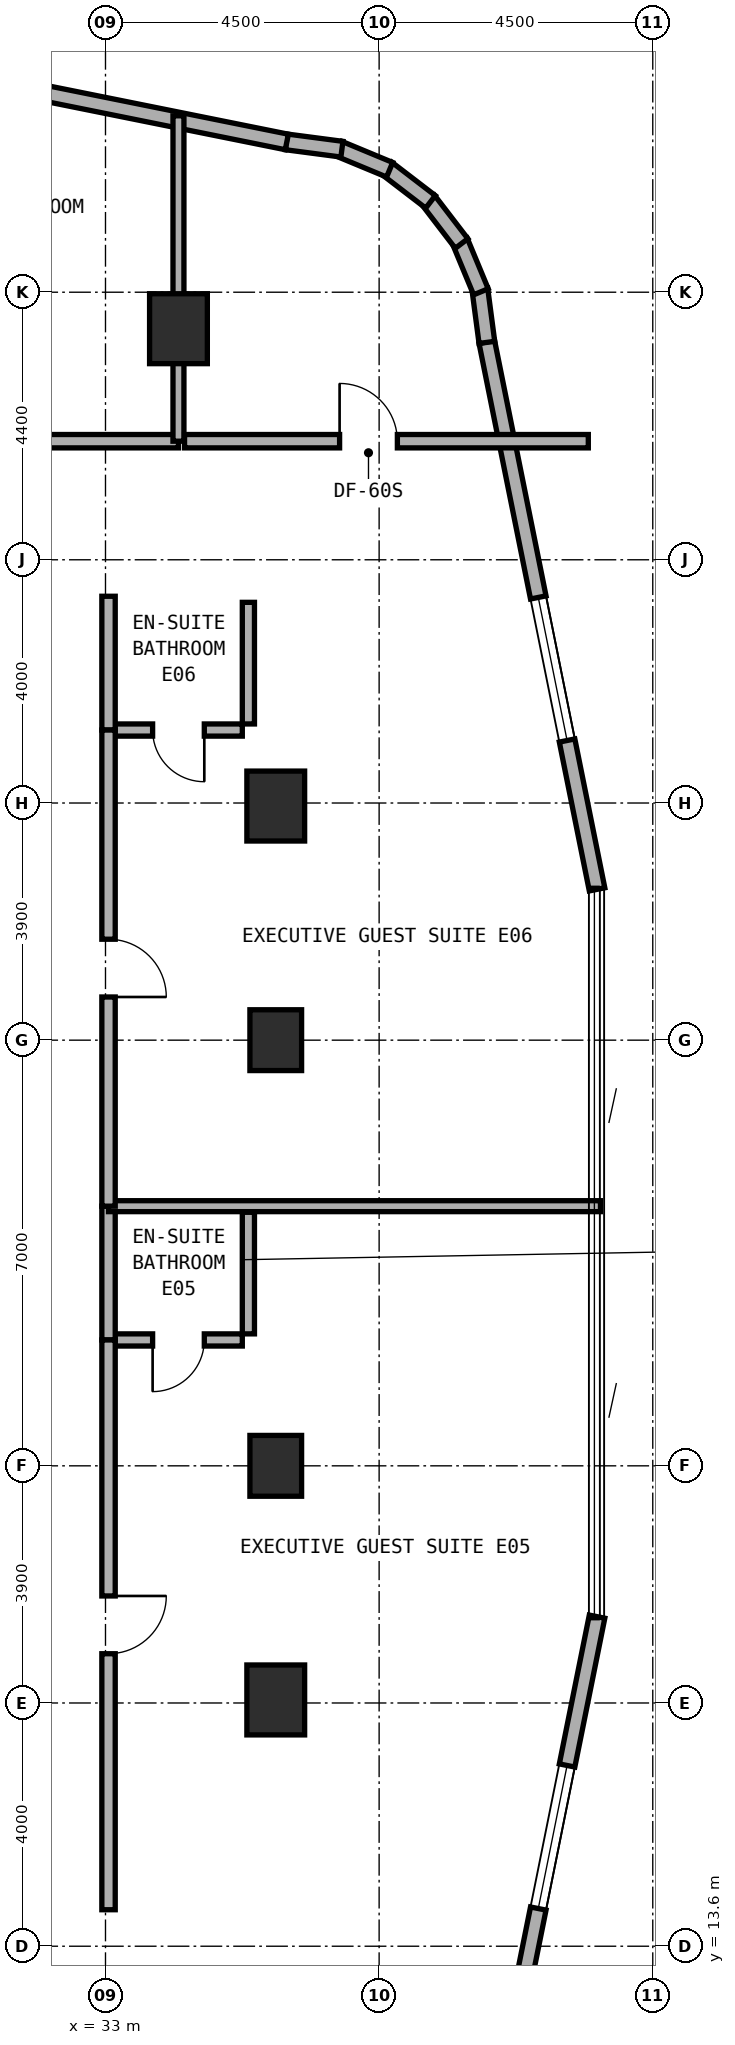
"""IFC4 building model, lengths in metres.
Left out: names, types, materials, properties, quantities, classifications, styles, units other than length and angle.
Written with IfcOpenShell. Run it as: python <this file> out.ifc"""

import sys

from ifc_helpers import new_model, si_unit, direction, frame, frame_2d, origin, origin_2d, place, context, subcontext, project, spatial, rectangle, extrude, element, fill, save


model = new_model("IFC4")
c1 = context("Model", 3, precision=1e-05, world=origin(), true_north=direction((0.0, 1.0)))
c2 = subcontext(c1, "Body", "Model", "MODEL_VIEW")
j1 = project(units=[si_unit("LENGTHUNIT", "METRE"), si_unit("PLANEANGLEUNIT", "RADIAN")], contexts=[c1])
p1 = place(None, origin())
s1 = spatial("IfcSite", under=j1, at=p1, CompositionType="ELEMENT")
p2 = place(p1, origin())
s2 = spatial("IfcBuilding", under=s1, at=p2, CompositionType="ELEMENT")
p3 = place(p2, frame((0.0, 0.0, 112.5)))
s3 = spatial("IfcBuildingStorey", under=s2, at=p3, CompositionType="ELEMENT", Elevation=112.5)
p4 = place(p3, frame((34.2, 40.2, 0.0), z_axis=(0.0, 0.0, 1.0), x_axis=(1.0, 0.0, 0.0)))
e1 = element("IfcColumn", 1, at=p4, inside=s3, PredefinedType="COLUMN", context=c2, shape_type="SweptSolid", body=[
    extrude(rectangle(XDim=0.95, YDim=1.15, at=origin_2d()), origin(), (0.0, 0.0, 1.0), 3.5),
])
for number, where, z_axis, x_axis in (
    (2, (35.8, 21.5, 0.0), (0.0, 0.0, 1.0), (1.0, 0.0, 0.0)),
    (3, (35.8, 28.5, 0.0), (0.0, 0.0, 1.0), (1.0, 0.0, 0.0)),
):
    element("IfcColumn", number, at=place(p3, frame(where, z_axis=z_axis, x_axis=x_axis)), inside=s3, PredefinedType="COLUMN", context=c2, shape_type="SweptSolid", body=[
        extrude(rectangle(XDim=0.85, YDim=1.0, at=origin_2d()), origin(), (0.0, 0.0, 1.0), 3.5),
    ])
for number, where, z_axis, x_axis in (
    (4, (35.8, 17.65, 0.0), (0.0, 0.0, 1.0), (1.0, 0.0, 0.0)),
    (5, (35.8, 32.35, 0.0), (0.0, 0.0, 1.0), (1.0, 0.0, 0.0)),
):
    element("IfcColumn", number, at=place(p3, frame(where, z_axis=z_axis, x_axis=x_axis)), inside=s3, PredefinedType="COLUMN", context=c2, shape_type="SweptSolid", body=[
        extrude(rectangle(XDim=0.95, YDim=1.15, at=origin_2d()), origin(), (0.0, 0.0, 1.0), 3.5),
    ])
p5 = place(p3, frame((39.271, 10.018, 0.0), z_axis=(0.0, 0.0, 1.0), x_axis=(0.197435082048, 0.980315963543, 0.0)))
e6 = element("IfcWall", 6, at=p5, inside=s3, PredefinedType="STANDARD", context=c2, shape_type="SweptSolid", body=[
    extrude(rectangle(XDim=9.183, YDim=0.26, at=frame_2d((4.591, 0.0))), origin(), (0.0, 0.0, 1.0), 3.22),
])
p6 = place(p5, frame((4.286, 0.0, 0.8)))
e7 = element("IfcOpeningElement", 7, at=p6, cuts=e6, PredefinedType="OPENING", context=c2, shape_type="SweptSolid", body=[
    extrude(rectangle(XDim=2.4, YDim=1.6, at=frame_2d((1.2, 0.8))), frame((0.0, 0.14, 0.0), z_axis=(0.0, -1.0, 0.0), x_axis=(1.0, 0.0, 0.0)), (0.0, 0.0, 1.0), 0.28),
])
p7 = place(p3, frame((41.084, 30.98, 0.0), z_axis=(0.0, 0.0, 1.0), x_axis=(-0.197435082048, 0.980315963543, 0.0)))
e8 = element("IfcWall", 8, at=p7, inside=s3, PredefinedType="STANDARD", context=c2, shape_type="SweptSolid", body=[
    extrude(rectangle(XDim=9.183, YDim=0.26, at=frame_2d((4.591, 0.0))), origin(), (0.0, 0.0, 1.0), 3.22),
])
p8 = place(p7, frame((2.497, 0.0, 0.8)))
e9 = element("IfcOpeningElement", 9, at=p8, cuts=e8, PredefinedType="OPENING", context=c2, shape_type="SweptSolid", body=[
    extrude(rectangle(XDim=2.4, YDim=1.6, at=frame_2d((1.2, 0.8))), frame((0.0, 0.14, 0.0), z_axis=(0.0, -1.0, 0.0), x_axis=(1.0, 0.0, 0.0)), (0.0, 0.0, 1.0), 0.28),
])
p9 = place(p3, frame((39.272, 39.975, 0.0), z_axis=(0.0, 0.0, 1.0), x_axis=(-0.130953706898, 0.991388484223, 0.0)))
e10 = element("IfcWall", 10, at=p9, inside=s3, PredefinedType="STANDARD", context=c2, shape_type="SweptSolid", body=[
    extrude(rectangle(XDim=0.885, YDim=0.26, at=frame_2d((0.443, 0.0))), origin(), (0.0, 0.0, 1.0), 3.22),
])
p10 = place(p3, frame((39.174, 40.807, 0.0), z_axis=(0.0, 0.0, 1.0), x_axis=(-0.383290660547, 0.923627776508, 0.0)))
e11 = element("IfcWall", 11, at=p10, inside=s3, PredefinedType="STANDARD", context=c2, shape_type="SweptSolid", body=[
    extrude(rectangle(XDim=0.903, YDim=0.26, at=frame_2d((0.452, 0.0))), origin(), (0.0, 0.0, 1.0), 3.22),
])
p11 = place(p3, frame((38.856, 41.601, 0.0), z_axis=(0.0, 0.0, 1.0), x_axis=(-0.608624690463, 0.793458244748, 0.0)))
e12 = element("IfcWall", 12, at=p11, inside=s3, PredefinedType="STANDARD", context=c2, shape_type="SweptSolid", body=[
    extrude(rectangle(XDim=0.902, YDim=0.26, at=frame_2d((0.451, 0.0))), origin(), (0.0, 0.0, 1.0), 3.22),
])
p12 = place(p3, frame((38.345, 42.286, 0.0), z_axis=(0.0, 0.0, 1.0), x_axis=(-0.793558456666, 0.608494022858, 0.0)))
e13 = element("IfcWall", 13, at=p12, inside=s3, PredefinedType="STANDARD", context=c2, shape_type="SweptSolid", body=[
    extrude(rectangle(XDim=0.902, YDim=0.26, at=frame_2d((0.451, 0.0))), origin(), (0.0, 0.0, 1.0), 3.22),
])
p13 = place(p3, frame((37.673, 42.814, 0.0), z_axis=(0.0, 0.0, 1.0), x_axis=(-0.923683767999, 0.383155708213, 0.0)))
e14 = element("IfcWall", 14, at=p13, inside=s3, PredefinedType="STANDARD", context=c2, shape_type="SweptSolid", body=[
    extrude(rectangle(XDim=0.903, YDim=0.26, at=frame_2d((0.451, 0.0))), origin(), (0.0, 0.0, 1.0), 3.22),
])
p14 = place(p3, frame((36.888, 43.152, 0.0), z_axis=(0.0, 0.0, 1.0), x_axis=(-0.991487658083, 0.130200706103, 0.0)))
e15 = element("IfcWall", 15, at=p14, inside=s3, PredefinedType="STANDARD", context=c2, shape_type="SweptSolid", body=[
    extrude(rectangle(XDim=0.921, YDim=0.26, at=frame_2d((0.46, 0.0))), origin(), (0.0, 0.0, 1.0), 3.22),
])
p15 = place(p3, frame((35.982, 43.271, 0.0), z_axis=(0.0, 0.0, 1.0), x_axis=(-0.980317172899, 0.197429077186, 0.0)))
e16 = element("IfcWall", 16, at=p15, inside=s3, PredefinedType="STANDARD", context=c2, shape_type="SweptSolid", body=[
    extrude(rectangle(XDim=9.117, YDim=0.26, at=frame_2d((4.559, 0.0))), origin(), (0.0, 0.0, 1.0), 3.22),
])
p16 = place(p15, frame((4.305, 0.0, 0.8)))
e17 = element("IfcOpeningElement", 17, at=p16, cuts=e16, PredefinedType="OPENING", context=c2, shape_type="SweptSolid", body=[
    extrude(rectangle(XDim=2.4, YDim=1.6, at=frame_2d((1.2, 0.8))), frame((0.0, 0.14, 0.0), z_axis=(0.0, -1.0, 0.0), x_axis=(1.0, 0.0, 0.0)), (0.0, 0.0, 1.0), 0.28),
])
p17 = place(p3, frame((28.0, 38.35, 0.0), z_axis=(0.0, 0.0, 1.0), x_axis=(1.0, 0.0, 0.0)))
e18 = element("IfcWall", 18, at=p17, inside=s3, PredefinedType="SOLIDWALL", context=c2, shape_type="SweptSolid", body=[
    extrude(rectangle(XDim=6.2, YDim=0.22, at=frame_2d((3.1, 0.0))), origin(), (0.0, 0.0, 1.0), 2.695),
])
p18 = place(p17, frame((2.625, 0.0, 0.0)))
e19 = element("IfcOpeningElement", 19, at=p18, cuts=e18, PredefinedType="OPENING", context=c2, shape_type="SweptSolid", body=[
    extrude(rectangle(XDim=0.95, YDim=2.1, at=frame_2d((0.475, 1.05))), frame((0.0, 0.12, 0.0), z_axis=(0.0, -1.0, 0.0), x_axis=(1.0, 0.0, 0.0)), (0.0, 0.0, 1.0), 0.24),
])
p19 = place(p3, frame((34.2, 38.35, 0.0), z_axis=(0.0, 0.0, 1.0), x_axis=(0.0, 1.0, 0.0)))
e20 = element("IfcWall", 20, at=p19, inside=s3, PredefinedType="SOLIDWALL", context=c2, shape_type="SweptSolid", body=[
    extrude(rectangle(XDim=5.351, YDim=0.18, at=frame_2d((2.675, 0.0))), origin(), (0.0, 0.0, 1.0), 2.695),
])
p20 = place(p3, frame((34.3, 38.35, 0.0), z_axis=(0.0, 0.0, 1.0), x_axis=(1.0, 0.0, 0.0)))
e21 = element("IfcWall", 21, at=p20, inside=s3, PredefinedType="SOLIDWALL", context=c2, shape_type="SweptSolid", body=[
    extrude(rectangle(XDim=6.64, YDim=0.22, at=frame_2d((3.32, 0.0))), origin(), (0.0, 0.0, 1.0), 2.835),
])
p21 = place(p20, frame((2.55, 0.0, 0.0)))
e22 = element("IfcOpeningElement", 22, at=p21, cuts=e21, PredefinedType="OPENING", context=c2, shape_type="SweptSolid", body=[
    extrude(rectangle(XDim=0.95, YDim=2.1, at=frame_2d((0.475, 1.05))), frame((0.0, 0.12, 0.0), z_axis=(0.0, -1.0, 0.0), x_axis=(1.0, 0.0, 0.0)), (0.0, 0.0, 1.0), 0.24),
])
p22 = place(p3, frame((33.15, 23.57, 0.0), z_axis=(0.0, 0.0, 1.0), x_axis=(1.0, 0.0, 0.0)))
e23 = element("IfcWall", 23, at=p22, inside=s3, PredefinedType="PLUMBINGWALL", context=c2, shape_type="SweptSolid", body=[
    extrude(rectangle(XDim=2.1, YDim=0.2, at=frame_2d((1.05, 0.0))), origin(), (0.0, 0.0, 1.0), 3.22),
])
p23 = place(p22, frame((0.625, 0.0, 0.0)))
e24 = element("IfcOpeningElement", 24, at=p23, cuts=e23, PredefinedType="OPENING", context=c2, shape_type="SweptSolid", body=[
    extrude(rectangle(XDim=0.85, YDim=2.1, at=frame_2d((0.425, 1.05))), frame((0.0, 0.11, 0.0), z_axis=(0.0, -1.0, 0.0), x_axis=(1.0, 0.0, 0.0)), (0.0, 0.0, 1.0), 0.22),
])
p24 = place(p3, frame((35.35, 23.67, 0.0), z_axis=(0.0, 0.0, 1.0), x_axis=(0.0, 1.0, 0.0)))
e25 = element("IfcWall", 25, at=p24, inside=s3, PredefinedType="PLUMBINGWALL", context=c2, shape_type="SweptSolid", body=[
    extrude(rectangle(XDim=2.0, YDim=0.2, at=frame_2d((1.0, 0.0))), origin(), (0.0, 0.0, 1.0), 3.22),
])
p25 = place(p3, frame((33.05, 23.57, 0.0), z_axis=(0.0, 0.0, 1.0), x_axis=(0.0, 1.0, 0.0)))
e26 = element("IfcWall", 26, at=p25, inside=s3, PredefinedType="SOLIDWALL", context=c2, shape_type="SweptSolid", body=[
    extrude(rectangle(XDim=2.2, YDim=0.22, at=frame_2d((1.1, 0.0))), origin(), (0.0, 0.0, 1.0), 3.22),
])
p26 = place(p3, frame((33.05, 14.2, 0.0), z_axis=(0.0, 0.0, 1.0), x_axis=(0.0, 1.0, 0.0)))
e27 = element("IfcWall", 27, at=p26, inside=s3, PredefinedType="SOLIDWALL", context=c2, shape_type="SweptSolid", body=[
    extrude(rectangle(XDim=9.37, YDim=0.22, at=frame_2d((4.685, 0.0))), origin(), (0.0, 0.0, 1.0), 2.695),
])
p27 = place(p26, frame((4.21, 0.0, 0.0)))
e28 = element("IfcOpeningElement", 28, at=p27, cuts=e27, PredefinedType="OPENING", context=c2, shape_type="SweptSolid", body=[
    extrude(rectangle(XDim=0.95, YDim=2.1, at=frame_2d((0.475, 1.05))), frame((0.0, 0.12, 0.0), z_axis=(0.0, -1.0, 0.0), x_axis=(1.0, 0.0, 0.0)), (0.0, 0.0, 1.0), 0.24),
])
p28 = place(p3, frame((33.05, 25.77, 0.0), z_axis=(0.0, 0.0, 1.0), x_axis=(1.0, 0.0, 0.0)))
e29 = element("IfcWall", 29, at=p28, inside=s3, PredefinedType="SOLIDWALL", context=c2, shape_type="SweptSolid", body=[
    extrude(rectangle(XDim=8.09, YDim=0.18, at=frame_2d((4.045, 0.0))), origin(), (0.0, 0.0, 1.0), 2.835),
])
p29 = place(p3, frame((33.15, 33.6, 0.0), z_axis=(0.0, 0.0, 1.0), x_axis=(1.0, 0.0, 0.0)))
e30 = element("IfcWall", 30, at=p29, inside=s3, PredefinedType="PLUMBINGWALL", context=c2, shape_type="SweptSolid", body=[
    extrude(rectangle(XDim=2.1, YDim=0.2, at=frame_2d((1.05, 0.0))), origin(), (0.0, 0.0, 1.0), 3.22),
])
p30 = place(p29, frame((0.625, 0.0, 0.0)))
e31 = element("IfcOpeningElement", 31, at=p30, cuts=e30, PredefinedType="OPENING", context=c2, shape_type="SweptSolid", body=[
    extrude(rectangle(XDim=0.85, YDim=2.1, at=frame_2d((0.425, 1.05))), frame((0.0, 0.11, 0.0), z_axis=(0.0, -1.0, 0.0), x_axis=(1.0, 0.0, 0.0)), (0.0, 0.0, 1.0), 0.22),
])
p31 = place(p3, frame((35.35, 33.7, 0.0), z_axis=(0.0, 0.0, 1.0), x_axis=(0.0, 1.0, 0.0)))
e32 = element("IfcWall", 32, at=p31, inside=s3, PredefinedType="PLUMBINGWALL", context=c2, shape_type="SweptSolid", body=[
    extrude(rectangle(XDim=2.0, YDim=0.2, at=frame_2d((1.0, 0.0))), origin(), (0.0, 0.0, 1.0), 2.835),
])
p32 = place(p3, frame((33.05, 33.6, 0.0), z_axis=(0.0, 0.0, 1.0), x_axis=(0.0, 1.0, 0.0)))
e33 = element("IfcWall", 33, at=p32, inside=s3, PredefinedType="SOLIDWALL", context=c2, shape_type="SweptSolid", body=[
    extrude(rectangle(XDim=2.2, YDim=0.22, at=frame_2d((1.1, 0.0))), origin(), (0.0, 0.0, 1.0), 3.22),
])
p33 = place(p3, frame((33.05, 25.77, 0.0), z_axis=(0.0, 0.0, 1.0), x_axis=(0.0, 1.0, 0.0)))
e34 = element("IfcWall", 34, at=p33, inside=s3, PredefinedType="SOLIDWALL", context=c2, shape_type="SweptSolid", body=[
    extrude(rectangle(XDim=7.83, YDim=0.22, at=frame_2d((3.915, 0.0))), origin(), (0.0, 0.0, 1.0), 2.695),
])
p34 = place(p33, frame((3.44, 0.0, 0.0)))
e35 = element("IfcOpeningElement", 35, at=p34, cuts=e34, PredefinedType="OPENING", context=c2, shape_type="SweptSolid", body=[
    extrude(rectangle(XDim=0.95, YDim=2.1, at=frame_2d((0.475, 1.05))), frame((0.0, 0.12, 0.0), z_axis=(0.0, -1.0, 0.0), x_axis=(1.0, 0.0, 0.0)), (0.0, 0.0, 1.0), 0.24),
])
p35 = place(p6, origin())
e36 = element("IfcWindow", 36, at=p35, inside=s3, PartitioningType="SINGLE_PANEL", PredefinedType="WINDOW", context=c2, shape_type="SweptSolid", body=[
    extrude(rectangle(XDim=2.4, YDim=1.6, at=frame_2d((1.2, 0.8))), frame((0.0, 0.03, 0.0), z_axis=(0.0, -1.0, 0.0), x_axis=(1.0, 0.0, 0.0)), (0.0, 0.0, 1.0), 0.06),
])
fill(e7, e36)
p36 = place(p8, origin())
e37 = element("IfcWindow", 37, at=p36, inside=s3, PartitioningType="SINGLE_PANEL", PredefinedType="WINDOW", context=c2, shape_type="SweptSolid", body=[
    extrude(rectangle(XDim=2.4, YDim=1.6, at=frame_2d((1.2, 0.8))), frame((0.0, 0.03, 0.0), z_axis=(0.0, -1.0, 0.0), x_axis=(1.0, 0.0, 0.0)), (0.0, 0.0, 1.0), 0.06),
])
fill(e9, e37)
p37 = place(p21, origin())
e38 = element("IfcDoor", 38, at=p37, inside=s3, OperationType="SINGLE_SWING_LEFT", PredefinedType="DOOR", context=c2, shape_type="SweptSolid", body=[
    extrude(rectangle(XDim=0.95, YDim=2.1, at=frame_2d((0.475, 1.05))), frame((0.0, 0.025, 0.0), z_axis=(0.0, -1.0, 0.0), x_axis=(1.0, 0.0, 0.0)), (0.0, 0.0, 1.0), 0.05),
])
fill(e22, e38)
p38 = place(p23, frame((0.85, 0.0, 0.0), z_axis=(0.0, 0.0, 1.0), x_axis=(-1.0, 0.0, 0.0)))
e39 = element("IfcDoor", 39, at=p38, inside=s3, OperationType="SINGLE_SWING_RIGHT", PredefinedType="DOOR", context=c2, shape_type="SweptSolid", body=[
    extrude(rectangle(XDim=0.85, YDim=2.1, at=frame_2d((0.425, 1.05))), frame((0.0, 0.025, 0.0), z_axis=(0.0, -1.0, 0.0), x_axis=(1.0, 0.0, 0.0)), (0.0, 0.0, 1.0), 0.05),
])
fill(e24, e39)
p39 = place(p27, frame((0.95, 0.0, 0.0), z_axis=(0.0, 0.0, 1.0), x_axis=(-1.0, 0.0, 0.0)))
e40 = element("IfcDoor", 40, at=p39, inside=s3, OperationType="SINGLE_SWING_LEFT", PredefinedType="DOOR", context=c2, shape_type="SweptSolid", body=[
    extrude(rectangle(XDim=0.95, YDim=2.1, at=frame_2d((0.475, 1.05))), frame((0.0, 0.025, 0.0), z_axis=(0.0, -1.0, 0.0), x_axis=(1.0, 0.0, 0.0)), (0.0, 0.0, 1.0), 0.05),
])
fill(e28, e40)
p40 = place(p30, frame((0.85, 0.0, 0.0), z_axis=(0.0, 0.0, 1.0), x_axis=(-1.0, 0.0, 0.0)))
e41 = element("IfcDoor", 41, at=p40, inside=s3, OperationType="SINGLE_SWING_LEFT", PredefinedType="DOOR", context=c2, shape_type="SweptSolid", body=[
    extrude(rectangle(XDim=0.85, YDim=2.1, at=frame_2d((0.425, 1.05))), frame((0.0, 0.025, 0.0), z_axis=(0.0, -1.0, 0.0), x_axis=(1.0, 0.0, 0.0)), (0.0, 0.0, 1.0), 0.05),
])
fill(e31, e41)
p41 = place(p34, frame((0.95, 0.0, 0.0), z_axis=(0.0, 0.0, 1.0), x_axis=(-1.0, 0.0, 0.0)))
e42 = element("IfcDoor", 42, at=p41, inside=s3, OperationType="SINGLE_SWING_RIGHT", PredefinedType="DOOR", context=c2, shape_type="SweptSolid", body=[
    extrude(rectangle(XDim=0.95, YDim=2.1, at=frame_2d((0.475, 1.05))), frame((0.0, 0.025, 0.0), z_axis=(0.0, -1.0, 0.0), x_axis=(1.0, 0.0, 0.0)), (0.0, 0.0, 1.0), 0.05),
])
fill(e35, e42)
save(model, sys.argv[1])
